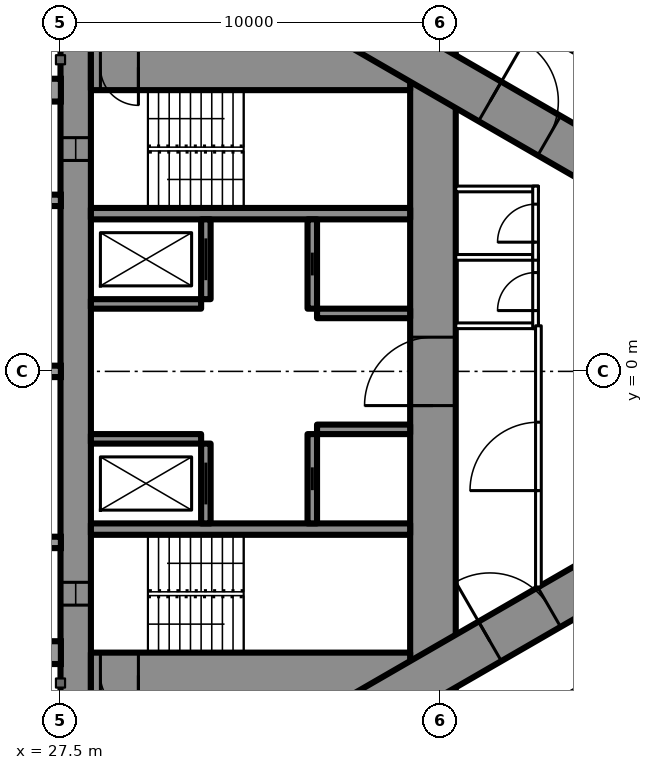
"""IFC4 building model, lengths in metres.
Left out: names, types, materials, properties, quantities, classifications, styles, units other than length and angle.
Written with IfcOpenShell. Run it as: python <this file> out.ifc"""

import sys

from ifc_helpers import new_model, si_unit, direction, frame, frame_2d, origin, place, context, subcontext, project, spatial, rectangle, extrude, element, fill, save


model = new_model("IFC4")
c1 = context("Model", 3, precision=1e-05, world=origin(), true_north=direction((0.0, 1.0)))
c2 = subcontext(c1, "Body", "Model", "MODEL_VIEW")
j1 = project(units=[si_unit("LENGTHUNIT", "METRE"), si_unit("PLANEANGLEUNIT", "RADIAN")], contexts=[c1])
p1 = place(None, origin())
s1 = spatial("IfcSite", under=j1, at=p1, CompositionType="ELEMENT")
p2 = place(p1, origin())
s2 = spatial("IfcBuilding", under=s1, at=p2, CompositionType="ELEMENT")
p3 = place(p2, frame((0.0, 0.0, 49.5)))
s3 = spatial("IfcBuildingStorey", under=s2, at=p3, CompositionType="ELEMENT", Elevation=49.5)
p4 = place(p3, frame((27.9, -8.6, 0.0), z_axis=(0.0, 0.0, 1.0), x_axis=(0.0, 1.0, 0.0)))
e1 = element("IfcWall", 1, at=p4, inside=s3, PredefinedType="SHEAR", context=c2, shape_type="SweptSolid", body=[
    extrude(rectangle(XDim=17.2, YDim=0.8, at=frame_2d((8.6, 0.0))), origin(), (0.0, 0.0, 1.0), 3.5),
])
p5 = place(p4, frame((2.45, 0.0, 0.6)))
e2 = element("IfcOpeningElement", 2, at=p5, cuts=e1, PredefinedType="OPENING", context=c2, shape_type="SweptSolid", body=[
    extrude(rectangle(XDim=0.6, YDim=2.1, at=frame_2d((0.3, 1.05))), frame((0.0, 0.41, 0.0), z_axis=(0.0, -1.0, 0.0), x_axis=(1.0, 0.0, 0.0)), (0.0, 0.0, 1.0), 0.82),
])
p6 = place(p4, frame((14.15, 0.0, 0.6)))
e3 = element("IfcOpeningElement", 3, at=p6, cuts=e1, PredefinedType="OPENING", context=c2, shape_type="SweptSolid", body=[
    extrude(rectangle(XDim=0.6, YDim=2.1, at=frame_2d((0.3, 1.05))), frame((0.0, 0.41, 0.0), z_axis=(0.0, -1.0, 0.0), x_axis=(1.0, 0.0, 0.0)), (0.0, 0.0, 1.0), 0.82),
])
p7 = place(p3, frame((37.3, -8.6, 0.0), z_axis=(0.0, 0.0, 1.0), x_axis=(0.0, 1.0, 0.0)))
e4 = element("IfcWall", 4, at=p7, inside=s3, PredefinedType="SHEAR", context=c2, shape_type="SweptSolid", body=[
    extrude(rectangle(XDim=17.2, YDim=1.2, at=frame_2d((8.6, 0.0))), origin(), (0.0, 0.0, 1.0), 3.5),
])
p8 = place(p7, frame((7.7, 0.0, 0.0)))
e5 = element("IfcOpeningElement", 5, at=p8, cuts=e4, PredefinedType="OPENING", context=c2, shape_type="SweptSolid", body=[
    extrude(rectangle(XDim=1.8, YDim=2.2, at=frame_2d((0.9, 1.1))), frame((0.0, 0.61, 0.0), z_axis=(0.0, -1.0, 0.0), x_axis=(1.0, 0.0, 0.0)), (0.0, 0.0, 1.0), 1.22),
])
p9 = place(p3, frame((28.3, -8.0, 0.0), z_axis=(0.0, 0.0, 1.0), x_axis=(1.0, 0.0, 0.0)))
e6 = element("IfcWall", 6, at=p9, inside=s3, PredefinedType="SHEAR", context=c2, shape_type="SweptSolid", body=[
    extrude(rectangle(XDim=8.4, YDim=1.2, at=frame_2d((4.2, 0.0))), origin(), (0.0, 0.0, 1.0), 3.5),
])
p10 = place(p9, frame((0.25, 0.0, 0.0)))
e7 = element("IfcOpeningElement", 7, at=p10, cuts=e6, PredefinedType="OPENING", context=c2, shape_type="SweptSolid", body=[
    extrude(rectangle(XDim=1.0, YDim=2.2, at=frame_2d((0.5, 1.1))), frame((0.0, 0.61, 0.0), z_axis=(0.0, -1.0, 0.0), x_axis=(1.0, 0.0, 0.0)), (0.0, 0.0, 1.0), 1.22),
])
p11 = place(p3, frame((28.3, 8.0, 0.0), z_axis=(0.0, 0.0, 1.0), x_axis=(1.0, 0.0, 0.0)))
e8 = element("IfcWall", 8, at=p11, inside=s3, PredefinedType="SHEAR", context=c2, shape_type="SweptSolid", body=[
    extrude(rectangle(XDim=8.4, YDim=1.2, at=frame_2d((4.2, 0.0))), origin(), (0.0, 0.0, 1.0), 3.5),
])
p12 = place(p11, frame((0.25, 0.0, 0.0)))
e9 = element("IfcOpeningElement", 9, at=p12, cuts=e8, PredefinedType="OPENING", context=c2, shape_type="SweptSolid", body=[
    extrude(rectangle(XDim=1.0, YDim=2.2, at=frame_2d((0.5, 1.1))), frame((0.0, 0.61, 0.0), z_axis=(0.0, -1.0, 0.0), x_axis=(1.0, 0.0, 0.0)), (0.0, 0.0, 1.0), 1.22),
])
for number, where, z_axis, x_axis in (
    (10, (28.3, -4.15, 0.0), (0.0, 0.0, 1.0), (1.0, 0.0, 0.0)),
    (11, (28.3, 4.15, 0.0), (0.0, 0.0, 1.0), (1.0, 0.0, 0.0)),
):
    element("IfcWall", number, at=place(p3, frame(where, z_axis=z_axis, x_axis=x_axis)), inside=s3, PredefinedType="SHEAR", context=c2, shape_type="SweptSolid", body=[
        extrude(rectangle(XDim=8.4, YDim=0.3, at=frame_2d((4.2, 0.0))), origin(), (0.0, 0.0, 1.0), 3.5),
    ])
p13 = place(p3, frame((31.325, -4.0, 0.0), z_axis=(0.0, 0.0, 1.0), x_axis=(0.0, 1.0, 0.0)))
e12 = element("IfcWall", 12, at=p13, inside=s3, PredefinedType="SHEAR", context=c2, shape_type="SweptSolid", body=[
    extrude(rectangle(XDim=2.1, YDim=0.25, at=frame_2d((1.05, 0.0))), origin(), (0.0, 0.0, 1.0), 3.5),
])
p14 = place(p13, frame((0.5, 0.0, 0.0)))
e13 = element("IfcOpeningElement", 13, at=p14, cuts=e12, PredefinedType="OPENING", context=c2, shape_type="SweptSolid", body=[
    extrude(rectangle(XDim=1.1, YDim=2.2, at=frame_2d((0.55, 1.1))), frame((0.0, 0.135, 0.0), z_axis=(0.0, -1.0, 0.0), x_axis=(1.0, 0.0, 0.0)), (0.0, 0.0, 1.0), 0.27),
])
p15 = place(p3, frame((34.125, -4.0, 0.0), z_axis=(0.0, 0.0, 1.0), x_axis=(0.0, 1.0, 0.0)))
e14 = element("IfcWall", 14, at=p15, inside=s3, PredefinedType="SHEAR", context=c2, shape_type="SweptSolid", body=[
    extrude(rectangle(XDim=2.35, YDim=0.25, at=frame_2d((1.175, 0.0))), origin(), (0.0, 0.0, 1.0), 3.5),
])
p16 = place(p15, frame((0.875, 0.0, 0.0)))
e15 = element("IfcOpeningElement", 15, at=p16, cuts=e14, PredefinedType="OPENING", context=c2, shape_type="SweptSolid", body=[
    extrude(rectangle(XDim=0.6, YDim=2.0, at=frame_2d((0.3, 1.0))), frame((0.0, 0.135, 0.0), z_axis=(0.0, -1.0, 0.0), x_axis=(1.0, 0.0, 0.0)), (0.0, 0.0, 1.0), 0.27),
])
p17 = place(p3, frame((28.3, -1.775, 0.0), z_axis=(0.0, 0.0, 1.0), x_axis=(1.0, 0.0, 0.0)))
e16 = element("IfcWall", 16, at=p17, inside=s3, PredefinedType="SHEAR", context=c2, shape_type="SweptSolid", body=[
    extrude(rectangle(XDim=2.9, YDim=0.25, at=frame_2d((1.45, 0.0))), origin(), (0.0, 0.0, 1.0), 3.5),
])
p18 = place(p3, frame((34.25, -1.525, 0.0), z_axis=(0.0, 0.0, 1.0), x_axis=(1.0, 0.0, 0.0)))
e17 = element("IfcWall", 17, at=p18, inside=s3, PredefinedType="SHEAR", context=c2, shape_type="SweptSolid", body=[
    extrude(rectangle(XDim=2.45, YDim=0.25, at=frame_2d((1.225, 0.0))), origin(), (0.0, 0.0, 1.0), 3.5),
])
p19 = place(p3, frame((31.325, 1.9, 0.0), z_axis=(0.0, 0.0, 1.0), x_axis=(0.0, 1.0, 0.0)))
e18 = element("IfcWall", 18, at=p19, inside=s3, PredefinedType="SHEAR", context=c2, shape_type="SweptSolid", body=[
    extrude(rectangle(XDim=2.1, YDim=0.25, at=frame_2d((1.05, 0.0))), origin(), (0.0, 0.0, 1.0), 3.5),
])
p20 = place(p19, frame((0.5, 0.0, 0.0)))
e19 = element("IfcOpeningElement", 19, at=p20, cuts=e18, PredefinedType="OPENING", context=c2, shape_type="SweptSolid", body=[
    extrude(rectangle(XDim=1.1, YDim=2.2, at=frame_2d((0.55, 1.1))), frame((0.0, 0.135, 0.0), z_axis=(0.0, -1.0, 0.0), x_axis=(1.0, 0.0, 0.0)), (0.0, 0.0, 1.0), 0.27),
])
p21 = place(p3, frame((34.125, 1.65, 0.0), z_axis=(0.0, 0.0, 1.0), x_axis=(0.0, 1.0, 0.0)))
e20 = element("IfcWall", 20, at=p21, inside=s3, PredefinedType="SHEAR", context=c2, shape_type="SweptSolid", body=[
    extrude(rectangle(XDim=2.35, YDim=0.25, at=frame_2d((1.175, 0.0))), origin(), (0.0, 0.0, 1.0), 3.5),
])
p22 = place(p21, frame((0.875, 0.0, 0.0)))
e21 = element("IfcOpeningElement", 21, at=p22, cuts=e20, PredefinedType="OPENING", context=c2, shape_type="SweptSolid", body=[
    extrude(rectangle(XDim=0.6, YDim=2.0, at=frame_2d((0.3, 1.0))), frame((0.0, 0.135, 0.0), z_axis=(0.0, -1.0, 0.0), x_axis=(1.0, 0.0, 0.0)), (0.0, 0.0, 1.0), 0.27),
])
p23 = place(p3, frame((28.3, 1.775, 0.0), z_axis=(0.0, 0.0, 1.0), x_axis=(1.0, 0.0, 0.0)))
e22 = element("IfcWall", 22, at=p23, inside=s3, PredefinedType="SHEAR", context=c2, shape_type="SweptSolid", body=[
    extrude(rectangle(XDim=2.9, YDim=0.25, at=frame_2d((1.45, 0.0))), origin(), (0.0, 0.0, 1.0), 3.5),
])
p24 = place(p3, frame((34.25, 1.525, 0.0), z_axis=(0.0, 0.0, 1.0), x_axis=(1.0, 0.0, 0.0)))
e23 = element("IfcWall", 23, at=p24, inside=s3, PredefinedType="SHEAR", context=c2, shape_type="SweptSolid", body=[
    extrude(rectangle(XDim=2.45, YDim=0.25, at=frame_2d((1.225, 0.0))), origin(), (0.0, 0.0, 1.0), 3.5),
])
p25 = place(p3, frame((27.2, -13.8, 0.0), z_axis=(0.0, 0.0, 1.0), x_axis=(0.866027159892, 0.499996958321, 0.0)))
e24 = element("IfcWall", 24, at=p25, inside=s3, PredefinedType="SHEAR", context=c2, shape_type="SweptSolid", body=[
    extrude(rectangle(XDim=27.947, YDim=1.2, at=frame_2d((13.973, 0.0))), origin(), (0.0, 0.0, 1.0), 3.5),
])
p26 = place(p25, frame((4.6, 0.0, 0.0)))
e25 = element("IfcOpeningElement", 25, at=p26, cuts=e24, PredefinedType="OPENING", context=c2, shape_type="SweptSolid", body=[
    extrude(rectangle(XDim=1.0, YDim=2.2, at=frame_2d((0.5, 1.1))), frame((0.0, 0.61, 0.0), z_axis=(0.0, -1.0, 0.0), x_axis=(1.0, 0.0, 0.0)), (0.0, 0.0, 1.0), 1.22),
])
p27 = place(p25, frame((13.395, 0.0, 0.0)))
e26 = element("IfcOpeningElement", 26, at=p27, cuts=e24, PredefinedType="OPENING", context=c2, shape_type="SweptSolid", body=[
    extrude(rectangle(XDim=1.8, YDim=2.2, at=frame_2d((0.9, 1.1))), frame((0.0, 0.61, 0.0), z_axis=(0.0, -1.0, 0.0), x_axis=(1.0, 0.0, 0.0)), (0.0, 0.0, 1.0), 1.22),
])
p28 = place(p3, frame((27.2, 13.8, 0.0), z_axis=(0.0, 0.0, 1.0), x_axis=(0.866024515034, -0.500001539357, 0.0)))
e27 = element("IfcWall", 27, at=p28, inside=s3, PredefinedType="SHEAR", context=c2, shape_type="SweptSolid", body=[
    extrude(rectangle(XDim=26.907, YDim=1.2, at=frame_2d((13.454, 0.0))), origin(), (0.0, 0.0, 1.0), 3.5),
])
p29 = place(p28, frame((4.6, 0.0, 0.0)))
e28 = element("IfcOpeningElement", 28, at=p29, cuts=e27, PredefinedType="OPENING", context=c2, shape_type="SweptSolid", body=[
    extrude(rectangle(XDim=1.0, YDim=2.2, at=frame_2d((0.5, 1.1))), frame((0.0, 0.61, 0.0), z_axis=(0.0, -1.0, 0.0), x_axis=(1.0, 0.0, 0.0)), (0.0, 0.0, 1.0), 1.22),
])
p30 = place(p28, frame((13.395, 0.0, 0.0)))
e29 = element("IfcOpeningElement", 29, at=p30, cuts=e27, PredefinedType="OPENING", context=c2, shape_type="SweptSolid", body=[
    extrude(rectangle(XDim=1.8, YDim=2.2, at=frame_2d((0.9, 1.1))), frame((0.0, 0.61, 0.0), z_axis=(0.0, -1.0, 0.0), x_axis=(1.0, 0.0, 0.0)), (0.0, 0.0, 1.0), 1.22),
])
p31 = place(p3, frame((37.96, -10.243, 0.0), z_axis=(0.0, 0.0, 1.0), x_axis=(0.866026429433, 0.499998223521, 0.0)))
e30 = element("IfcWall", 30, at=p31, inside=s3, PredefinedType="PARTITIONING", context=c2, shape_type="SweptSolid", body=[
    extrude(rectangle(XDim=20.487, YDim=0.2, at=frame_2d((10.243, 0.0))), origin(), (0.0, 0.0, 1.0), 3.25),
])
p32 = place(p31, frame((6.925, 0.0, 0.0)))
e31 = element("IfcOpeningElement", 31, at=p32, cuts=e30, PredefinedType="OPENING", context=c2, shape_type="SweptSolid", body=[
    extrude(rectangle(XDim=0.95, YDim=2.2, at=frame_2d((0.475, 1.1))), frame((0.0, 0.11, 0.0), z_axis=(0.0, -1.0, 0.0), x_axis=(1.0, 0.0, 0.0)), (0.0, 0.0, 1.0), 0.22),
])
p33 = place(p31, frame((11.549, 0.0, 0.0)))
e32 = element("IfcOpeningElement", 32, at=p33, cuts=e30, PredefinedType="OPENING", context=c2, shape_type="SweptSolid", body=[
    extrude(rectangle(XDim=0.95, YDim=2.2, at=frame_2d((0.475, 1.1))), frame((0.0, 0.11, 0.0), z_axis=(0.0, -1.0, 0.0), x_axis=(1.0, 0.0, 0.0)), (0.0, 0.0, 1.0), 0.22),
])
p34 = place(p31, frame((13.249, 0.0, 0.0)))
e33 = element("IfcOpeningElement", 33, at=p34, cuts=e30, PredefinedType="OPENING", context=c2, shape_type="SweptSolid", body=[
    extrude(rectangle(XDim=0.95, YDim=2.2, at=frame_2d((0.475, 1.1))), frame((0.0, 0.11, 0.0), z_axis=(0.0, -1.0, 0.0), x_axis=(1.0, 0.0, 0.0)), (0.0, 0.0, 1.0), 0.22),
])
p35 = place(p31, frame((17.585, 0.0, 0.0)))
e34 = element("IfcOpeningElement", 34, at=p35, cuts=e30, PredefinedType="OPENING", context=c2, shape_type="SweptSolid", body=[
    extrude(rectangle(XDim=0.95, YDim=2.2, at=frame_2d((0.475, 1.1))), frame((0.0, 0.11, 0.0), z_axis=(0.0, -1.0, 0.0), x_axis=(1.0, 0.0, 0.0)), (0.0, 0.0, 1.0), 0.22),
])
p36 = place(p31, frame((0.6, 0.0, 0.0)))
e35 = element("IfcOpeningElement", 35, at=p36, cuts=e30, PredefinedType="OPENING", context=c2, shape_type="SweptSolid", body=[
    extrude(rectangle(XDim=0.95, YDim=2.2, at=frame_2d((0.475, 1.1))), frame((0.0, 0.11, 0.0), z_axis=(0.0, -1.0, 0.0), x_axis=(1.0, 0.0, 0.0)), (0.0, 0.0, 1.0), 0.22),
])
p37 = place(p3, frame((36.834, 10.894, 0.0), z_axis=(0.0, 0.0, 1.0), x_axis=(0.866031136856, -0.499990069898, 0.0)))
e36 = element("IfcWall", 36, at=p37, inside=s3, PredefinedType="PARTITIONING", context=c2, shape_type="SweptSolid", body=[
    extrude(rectangle(XDim=5.475, YDim=0.2, at=frame_2d((2.738, 0.0))), origin(), (0.0, 0.0, 1.0), 3.25),
])
p38 = place(p37, frame((1.542, 0.0, 0.0)))
e37 = element("IfcOpeningElement", 37, at=p38, cuts=e36, PredefinedType="OPENING", context=c2, shape_type="SweptSolid", body=[
    extrude(rectangle(XDim=0.95, YDim=2.2, at=frame_2d((0.475, 1.1))), frame((0.0, 0.11, 0.0), z_axis=(0.0, -1.0, 0.0), x_axis=(1.0, 0.0, 0.0)), (0.0, 0.0, 1.0), 0.22),
])
p39 = place(p37, frame((0.246, 0.0, 0.0)))
e38 = element("IfcOpeningElement", 38, at=p39, cuts=e36, PredefinedType="OPENING", context=c2, shape_type="SweptSolid", body=[
    extrude(rectangle(XDim=0.9, YDim=2.2, at=frame_2d((0.45, 1.1))), frame((0.0, 0.11, 0.0), z_axis=(0.0, -1.0, 0.0), x_axis=(1.0, 0.0, 0.0)), (0.0, 0.0, 1.0), 0.22),
])
for number, where, z_axis, x_axis in (
    (39, (37.9, 1.2, 0.0), (0.0, 0.0, 1.0), (1.0, 0.0, 0.0)),
    (40, (37.9, 3.0, 0.0), (0.0, 0.0, 1.0), (1.0, 0.0, 0.0)),
    (41, (37.9, 4.8, 0.0), (0.0, 0.0, 1.0), (1.0, 0.0, 0.0)),
):
    element("IfcWall", number, at=place(p3, frame(where, z_axis=z_axis, x_axis=x_axis)), inside=s3, PredefinedType="PARTITIONING", context=c2, shape_type="SweptSolid", body=[
        extrude(rectangle(XDim=2.175, YDim=0.15, at=frame_2d((1.087, 0.0))), origin(), (0.0, 0.0, 1.0), 3.25),
    ])
p40 = place(p3, frame((40.0, 1.125, 0.0), z_axis=(0.0, 0.0, 1.0), x_axis=(0.0, 1.0, 0.0)))
e42 = element("IfcWall", 42, at=p40, inside=s3, PredefinedType="PARTITIONING", context=c2, shape_type="SweptSolid", body=[
    extrude(rectangle(XDim=1.95, YDim=0.15, at=frame_2d((0.975, 0.0))), origin(), (0.0, 0.0, 1.0), 3.25),
])
p41 = place(p40, frame((0.475, 0.0, 0.0)))
e43 = element("IfcOpeningElement", 43, at=p41, cuts=e42, PredefinedType="OPENING", context=c2, shape_type="SweptSolid", body=[
    extrude(rectangle(XDim=1.0, YDim=2.2, at=frame_2d((0.5, 1.1))), frame((0.0, 0.085, 0.0), z_axis=(0.0, -1.0, 0.0), x_axis=(1.0, 0.0, 0.0)), (0.0, 0.0, 1.0), 0.17),
])
p42 = place(p3, frame((40.0, 2.925, 0.0), z_axis=(0.0, 0.0, 1.0), x_axis=(0.0, 1.0, 0.0)))
e44 = element("IfcWall", 44, at=p42, inside=s3, PredefinedType="PARTITIONING", context=c2, shape_type="SweptSolid", body=[
    extrude(rectangle(XDim=1.95, YDim=0.15, at=frame_2d((0.975, 0.0))), origin(), (0.0, 0.0, 1.0), 3.25),
])
p43 = place(p42, frame((0.475, 0.0, 0.0)))
e45 = element("IfcOpeningElement", 45, at=p43, cuts=e44, PredefinedType="OPENING", context=c2, shape_type="SweptSolid", body=[
    extrude(rectangle(XDim=1.0, YDim=2.2, at=frame_2d((0.5, 1.1))), frame((0.0, 0.085, 0.0), z_axis=(0.0, -1.0, 0.0), x_axis=(1.0, 0.0, 0.0)), (0.0, 0.0, 1.0), 0.17),
])
p44 = place(p3, frame((40.075, -5.674, 0.0), z_axis=(0.0, 0.0, 1.0), x_axis=(0.0, 1.0, 0.0)))
e46 = element("IfcWall", 46, at=p44, inside=s3, PredefinedType="PARTITIONING", context=c2, shape_type="SweptSolid", body=[
    extrude(rectangle(XDim=6.874, YDim=0.15, at=frame_2d((3.437, 0.0))), origin(), (0.0, 0.0, 1.0), 3.25),
])
p45 = place(p44, frame((2.537, 0.0, 0.0)))
e47 = element("IfcOpeningElement", 47, at=p45, cuts=e46, PredefinedType="OPENING", context=c2, shape_type="SweptSolid", body=[
    extrude(rectangle(XDim=1.8, YDim=2.2, at=frame_2d((0.9, 1.1))), frame((0.0, 0.085, 0.0), z_axis=(0.0, -1.0, 0.0), x_axis=(1.0, 0.0, 0.0)), (0.0, 0.0, 1.0), 0.17),
])
p46 = place(p41, origin())
e48 = element("IfcDoor", 48, at=p46, inside=s3, OperationType="SINGLE_SWING_LEFT", PredefinedType="DOOR", context=c2, shape_type="SweptSolid", body=[
    extrude(rectangle(XDim=1.0, YDim=2.2, at=frame_2d((0.5, 1.1))), frame((0.0, 0.025, 0.0), z_axis=(0.0, -1.0, 0.0), x_axis=(1.0, 0.0, 0.0)), (0.0, 0.0, 1.0), 0.05),
])
fill(e43, e48)
p47 = place(p43, origin())
e49 = element("IfcDoor", 49, at=p47, inside=s3, OperationType="SINGLE_SWING_LEFT", PredefinedType="DOOR", context=c2, shape_type="SweptSolid", body=[
    extrude(rectangle(XDim=1.0, YDim=2.2, at=frame_2d((0.5, 1.1))), frame((0.0, 0.025, 0.0), z_axis=(0.0, -1.0, 0.0), x_axis=(1.0, 0.0, 0.0)), (0.0, 0.0, 1.0), 0.05),
])
fill(e45, e49)
p48 = place(p45, origin())
e50 = element("IfcDoor", 50, at=p48, inside=s3, OperationType="DOUBLE_DOOR_SINGLE_SWING", PredefinedType="DOOR", context=c2, shape_type="SweptSolid", body=[
    extrude(rectangle(XDim=1.8, YDim=2.2, at=frame_2d((0.9, 1.1))), frame((0.0, 0.025, 0.0), z_axis=(0.0, -1.0, 0.0), x_axis=(1.0, 0.0, 0.0)), (0.0, 0.0, 1.0), 0.05),
])
fill(e47, e50)
p49 = place(p27, origin())
e51 = element("IfcDoor", 51, at=p49, inside=s3, OperationType="DOUBLE_DOOR_SINGLE_SWING", PredefinedType="DOOR", context=c2, shape_type="SweptSolid", body=[
    extrude(rectangle(XDim=1.8, YDim=2.2, at=frame_2d((0.9, 1.1))), frame((0.0, 0.025, 0.0), z_axis=(0.0, -1.0, 0.0), x_axis=(1.0, 0.0, 0.0)), (0.0, 0.0, 1.0), 0.05),
])
fill(e26, e51)
p50 = place(p30, origin())
e52 = element("IfcDoor", 52, at=p50, inside=s3, OperationType="DOUBLE_DOOR_SINGLE_SWING", PredefinedType="DOOR", context=c2, shape_type="SweptSolid", body=[
    extrude(rectangle(XDim=1.8, YDim=2.2, at=frame_2d((0.9, 1.1))), frame((0.0, 0.025, 0.0), z_axis=(0.0, -1.0, 0.0), x_axis=(1.0, 0.0, 0.0)), (0.0, 0.0, 1.0), 0.05),
])
fill(e29, e52)
p51 = place(p8, origin())
e53 = element("IfcDoor", 53, at=p51, inside=s3, OperationType="DOUBLE_DOOR_SINGLE_SWING", PredefinedType="DOOR", context=c2, shape_type="SweptSolid", body=[
    extrude(rectangle(XDim=1.8, YDim=2.2, at=frame_2d((0.9, 1.1))), frame((0.0, 0.025, 0.0), z_axis=(0.0, -1.0, 0.0), x_axis=(1.0, 0.0, 0.0)), (0.0, 0.0, 1.0), 0.05),
])
fill(e5, e53)
p52 = place(p10, origin())
e54 = element("IfcDoor", 54, at=p52, inside=s3, OperationType="SINGLE_SWING_RIGHT", PredefinedType="DOOR", context=c2, shape_type="SweptSolid", body=[
    extrude(rectangle(XDim=1.0, YDim=2.2, at=frame_2d((0.5, 1.1))), frame((0.0, 0.025, 0.0), z_axis=(0.0, -1.0, 0.0), x_axis=(1.0, 0.0, 0.0)), (0.0, 0.0, 1.0), 0.05),
])
fill(e7, e54)
p53 = place(p12, origin())
e55 = element("IfcDoor", 55, at=p53, inside=s3, OperationType="SINGLE_SWING_RIGHT", PredefinedType="DOOR", context=c2, shape_type="SweptSolid", body=[
    extrude(rectangle(XDim=1.0, YDim=2.2, at=frame_2d((0.5, 1.1))), frame((0.0, 0.025, 0.0), z_axis=(0.0, -1.0, 0.0), x_axis=(1.0, 0.0, 0.0)), (0.0, 0.0, 1.0), 0.05),
])
fill(e9, e55)
p54 = place(p14, origin())
e56 = element("IfcDoor", 56, at=p54, inside=s3, OperationType="SLIDING_TO_LEFT", PredefinedType="USERDEFINED", context=c2, shape_type="SweptSolid", body=[
    extrude(rectangle(XDim=1.1, YDim=2.2, at=frame_2d((0.55, 1.1))), frame((0.0, 0.025, 0.0), z_axis=(0.0, -1.0, 0.0), x_axis=(1.0, 0.0, 0.0)), (0.0, 0.0, 1.0), 0.05),
])
fill(e13, e56)
p55 = place(p20, origin())
e57 = element("IfcDoor", 57, at=p55, inside=s3, OperationType="SLIDING_TO_LEFT", PredefinedType="USERDEFINED", context=c2, shape_type="SweptSolid", body=[
    extrude(rectangle(XDim=1.1, YDim=2.2, at=frame_2d((0.55, 1.1))), frame((0.0, 0.025, 0.0), z_axis=(0.0, -1.0, 0.0), x_axis=(1.0, 0.0, 0.0)), (0.0, 0.0, 1.0), 0.05),
])
fill(e19, e57)
p56 = place(p16, origin())
e58 = element("IfcDoor", 58, at=p56, inside=s3, OperationType="SLIDING_TO_LEFT", PredefinedType="DOOR", context=c2, shape_type="SweptSolid", body=[
    extrude(rectangle(XDim=0.6, YDim=2.0, at=frame_2d((0.3, 1.0))), frame((0.0, 0.025, 0.0), z_axis=(0.0, -1.0, 0.0), x_axis=(1.0, 0.0, 0.0)), (0.0, 0.0, 1.0), 0.05),
])
fill(e15, e58)
p57 = place(p22, origin())
e59 = element("IfcDoor", 59, at=p57, inside=s3, OperationType="SLIDING_TO_LEFT", PredefinedType="DOOR", context=c2, shape_type="SweptSolid", body=[
    extrude(rectangle(XDim=0.6, YDim=2.0, at=frame_2d((0.3, 1.0))), frame((0.0, 0.025, 0.0), z_axis=(0.0, -1.0, 0.0), x_axis=(1.0, 0.0, 0.0)), (0.0, 0.0, 1.0), 0.05),
])
fill(e21, e59)
p58 = place(p5, origin())
e60 = element("IfcWindow", 60, at=p58, inside=s3, PartitioningType="SINGLE_PANEL", PredefinedType="WINDOW", context=c2, shape_type="SweptSolid", body=[
    extrude(rectangle(XDim=0.6, YDim=2.1, at=frame_2d((0.3, 1.05))), frame((0.0, 0.03, 0.0), z_axis=(0.0, -1.0, 0.0), x_axis=(1.0, 0.0, 0.0)), (0.0, 0.0, 1.0), 0.06),
])
fill(e2, e60)
p59 = place(p6, origin())
e61 = element("IfcWindow", 61, at=p59, inside=s3, PartitioningType="SINGLE_PANEL", PredefinedType="WINDOW", context=c2, shape_type="SweptSolid", body=[
    extrude(rectangle(XDim=0.6, YDim=2.1, at=frame_2d((0.3, 1.05))), frame((0.0, 0.03, 0.0), z_axis=(0.0, -1.0, 0.0), x_axis=(1.0, 0.0, 0.0)), (0.0, 0.0, 1.0), 0.06),
])
fill(e3, e61)
save(model, sys.argv[1])
